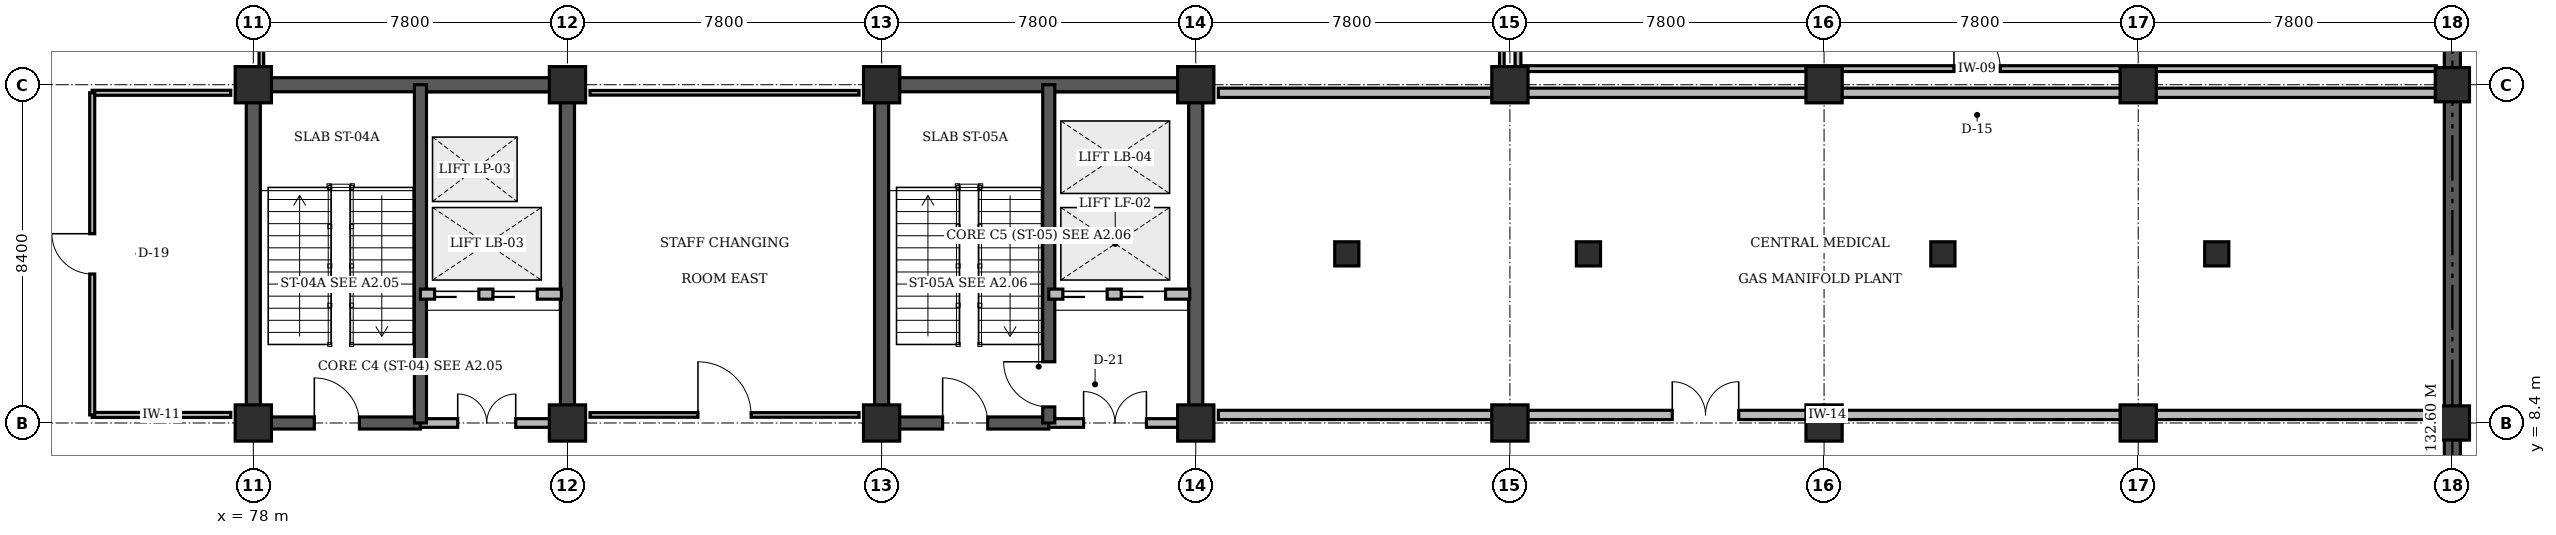
"""IFC4 building model, lengths in metres.
Left out: names, types, materials, properties, quantities, classifications, styles, units other than length and angle.
Written with IfcOpenShell. Run it as: python <this file> out.ifc"""

import sys

from ifc_helpers import new_model, si_unit, direction, frame, frame_2d, origin, origin_2d, place, context, subcontext, project, spatial, rectangle, circle, extrude, element, fill, save


model = new_model("IFC4")
c1 = context("Model", 3, precision=1e-05, world=origin(), true_north=direction((0.0, 1.0)))
c2 = subcontext(c1, "Body", "Model", "MODEL_VIEW")
j1 = project(units=[si_unit("LENGTHUNIT", "METRE"), si_unit("PLANEANGLEUNIT", "RADIAN")], contexts=[c1])
p1 = place(None, origin())
s1 = spatial("IfcSite", under=j1, at=p1, CompositionType="ELEMENT")
p2 = place(p1, origin())
s2 = spatial("IfcBuilding", under=s1, at=p2, CompositionType="ELEMENT")
p3 = place(p2, frame((0.0, 0.0, -4.8)))
s3 = spatial("IfcBuildingStorey", under=s2, at=p3, CompositionType="ELEMENT", Elevation=-4.8)
p4 = place(p3, frame((77.825, 16.8, 0.0), z_axis=(0.0, 0.0, 1.0), x_axis=(1.0, 0.0, 0.0)))
e1 = element("IfcWall", 1, at=p4, inside=s3, PredefinedType="SHEAR", context=c2, shape_type="SweptSolid", body=[
    extrude(rectangle(XDim=8.15, YDim=0.35, at=frame_2d((4.075, 0.0))), origin(), (0.0, 0.0, 1.0), 4.4),
])
for number, where, z_axis, x_axis in (
    (2, (78.0, 8.4, 0.0), (0.0, 0.0, 1.0), (0.0, 1.0, 0.0)),
    (3, (85.8, 8.4, 0.0), (0.0, 0.0, 1.0), (0.0, 1.0, 0.0)),
):
    element("IfcWall", number, at=place(p3, frame(where, z_axis=z_axis, x_axis=x_axis)), inside=s3, PredefinedType="SHEAR", context=c2, shape_type="SweptSolid", body=[
        extrude(rectangle(XDim=8.4, YDim=0.35, at=frame_2d((4.2, 0.0))), origin(), (0.0, 0.0, 1.0), 4.4),
    ])
p5 = place(p3, frame((93.425, 16.8, 0.0), z_axis=(0.0, 0.0, 1.0), x_axis=(1.0, 0.0, 0.0)))
e4 = element("IfcWall", 4, at=p5, inside=s3, PredefinedType="SHEAR", context=c2, shape_type="SweptSolid", body=[
    extrude(rectangle(XDim=8.15, YDim=0.35, at=frame_2d((4.075, 0.0))), origin(), (0.0, 0.0, 1.0), 4.4),
])
for number, where, z_axis, x_axis in (
    (5, (93.6, 8.4, 0.0), (0.0, 0.0, 1.0), (0.0, 1.0, 0.0)),
    (6, (101.4, 8.4, 0.0), (0.0, 0.0, 1.0), (0.0, 1.0, 0.0)),
):
    element("IfcWall", number, at=place(p3, frame(where, z_axis=z_axis, x_axis=x_axis)), inside=s3, PredefinedType="SHEAR", context=c2, shape_type="SweptSolid", body=[
        extrude(rectangle(XDim=8.4, YDim=0.35, at=frame_2d((4.2, 0.0))), origin(), (0.0, 0.0, 1.0), 4.4),
    ])
p6 = place(p3, frame((132.6, 0.0, 0.0), z_axis=(0.0, 0.0, 1.0), x_axis=(0.0, 1.0, 0.0)))
e7 = element("IfcWall", 7, at=p6, inside=s3, PredefinedType="SOLIDWALL", context=c2, shape_type="SweptSolid", body=[
    extrude(rectangle(XDim=42.0, YDim=0.4, at=frame_2d((21.0, 0.0))), origin(), (0.0, 0.0, 1.0), 4.8),
])
for number, where, z_axis, x_axis in (
    (8, (78.0, 8.4, 0.0), (0.0, 0.0, 1.0), (1.0, 0.0, 0.0)),
    (9, (78.0, 16.8, 0.0), (0.0, 0.0, 1.0), (1.0, 0.0, 0.0)),
    (10, (85.8, 8.4, 0.0), (0.0, 0.0, 1.0), (1.0, 0.0, 0.0)),
    (11, (85.8, 16.8, 0.0), (0.0, 0.0, 1.0), (1.0, 0.0, 0.0)),
    (12, (93.6, 8.4, 0.0), (0.0, 0.0, 1.0), (1.0, 0.0, 0.0)),
    (13, (93.6, 16.8, 0.0), (0.0, 0.0, 1.0), (1.0, 0.0, 0.0)),
    (14, (101.4, 8.4, 0.0), (0.0, 0.0, 1.0), (1.0, 0.0, 0.0)),
    (15, (101.4, 16.8, 0.0), (0.0, 0.0, 1.0), (1.0, 0.0, 0.0)),
    (16, (109.2, 8.4, 0.0), (0.0, 0.0, 1.0), (1.0, 0.0, 0.0)),
    (17, (109.2, 16.8, 0.0), (0.0, 0.0, 1.0), (1.0, 0.0, 0.0)),
    (18, (117.0, 8.4, 0.0), (0.0, 0.0, 1.0), (1.0, 0.0, 0.0)),
    (19, (117.0, 16.8, 0.0), (0.0, 0.0, 1.0), (1.0, 0.0, 0.0)),
    (20, (124.8, 8.4, 0.0), (0.0, 0.0, 1.0), (1.0, 0.0, 0.0)),
    (21, (124.8, 16.8, 0.0), (0.0, 0.0, 1.0), (1.0, 0.0, 0.0)),
):
    element("IfcColumn", number, at=place(p3, frame(where, z_axis=z_axis, x_axis=x_axis)), inside=s3, PredefinedType="COLUMN", context=c2, shape_type="SweptSolid", body=[
        extrude(rectangle(XDim=0.9, YDim=0.9, at=origin_2d()), origin(), (0.0, 0.0, 1.0), 4.8),
    ])
for number, where, z_axis, x_axis in (
    (22, (132.6, 8.4, 0.0), (0.0, 0.0, 1.0), (1.0, 0.0, 0.0)),
    (23, (132.6, 16.8, 0.0), (0.0, 0.0, 1.0), (1.0, 0.0, 0.0)),
):
    element("IfcColumn", number, at=place(p3, frame(where, z_axis=z_axis, x_axis=x_axis)), inside=s3, PredefinedType="COLUMN", context=c2, shape_type="SweptSolid", body=[
        extrude(rectangle(XDim=0.85, YDim=0.85, at=origin_2d()), origin(), (0.0, 0.0, 1.0), 4.8),
    ])
for number, where, z_axis, x_axis in (
    (24, (126.75, 12.6, -0.4), (0.0, 0.0, 1.0), (1.0, 0.0, 0.0)),
    (25, (119.95, 12.6, -0.4), (0.0, 0.0, 1.0), (1.0, 0.0, 0.0)),
    (26, (111.15, 12.6, -0.4), (0.0, 0.0, 1.0), (1.0, 0.0, 0.0)),
    (27, (105.15, 12.6, -0.4), (0.0, 0.0, 1.0), (1.0, 0.0, 0.0)),
):
    element("IfcColumn", number, at=place(p3, frame(where, z_axis=z_axis, x_axis=x_axis)), inside=s3, PredefinedType="PILASTER", context=c2, shape_type="SweptSolid", body=[
        extrude(circle(Radius=0.3, at=origin_2d()), origin(), (0.0, 0.0, 1.0), 5.2),
    ])
p7 = place(p3, frame((78.0, 8.4, 0.0), z_axis=(0.0, 0.0, 1.0), x_axis=(1.0, 0.0, 0.0)))
e28 = element("IfcWall", 28, at=p7, inside=s3, PredefinedType="SHEAR", context=c2, shape_type="SweptSolid", body=[
    extrude(rectangle(XDim=4.15, YDim=0.3, at=frame_2d((2.075, 0.0))), origin(), (0.0, 0.0, 1.0), 4.8),
])
p8 = place(p7, frame((1.515, 0.0, 0.0)))
e29 = element("IfcOpeningElement", 29, at=p8, cuts=e28, PredefinedType="OPENING", context=c2, shape_type="SweptSolid", body=[
    extrude(rectangle(XDim=1.12, YDim=2.15, at=frame_2d((0.56, 1.075))), frame((0.0, 0.16, 0.0), z_axis=(0.0, -1.0, 0.0), x_axis=(1.0, 0.0, 0.0)), (0.0, 0.0, 1.0), 0.32),
])
p9 = place(p3, frame((82.15, 8.4, 0.0), z_axis=(0.0, 0.0, 1.0), x_axis=(1.0, 0.0, 0.0)))
e30 = element("IfcWall", 30, at=p9, inside=s3, PredefinedType="STANDARD", context=c2, shape_type="SweptSolid", body=[
    extrude(rectangle(XDim=3.29, YDim=0.215, at=frame_2d((1.645, 0.0))), origin(), (0.0, 0.0, 1.0), 3.53),
])
p10 = place(p9, frame((0.925, 0.0, 0.0)))
e31 = element("IfcOpeningElement", 31, at=p10, cuts=e30, PredefinedType="OPENING", context=c2, shape_type="SweptSolid", body=[
    extrude(rectangle(XDim=1.44, YDim=2.2, at=frame_2d((0.72, 1.1))), frame((0.0, 0.118, 0.0), z_axis=(0.0, -1.0, 0.0), x_axis=(1.0, 0.0, 0.0)), (0.0, 0.0, 1.0), 0.235),
])
p11 = place(p3, frame((82.15, 8.4, 0.0), z_axis=(0.0, 0.0, 1.0), x_axis=(0.0, 1.0, 0.0)))
e32 = element("IfcWall", 32, at=p11, inside=s3, PredefinedType="SHEAR", context=c2, shape_type="SweptSolid", body=[
    extrude(rectangle(XDim=8.4, YDim=0.3, at=frame_2d((4.2, 0.0))), origin(), (0.0, 0.0, 1.0), 4.8),
])
p12 = place(p3, frame((82.15, 11.6, 0.0), z_axis=(0.0, 0.0, 1.0), x_axis=(1.0, 0.0, 0.0)))
e33 = element("IfcWall", 33, at=p12, inside=s3, PredefinedType="STANDARD", context=c2, shape_type="SweptSolid", body=[
    extrude(rectangle(XDim=3.5, YDim=0.25, at=frame_2d((1.75, 0.0))), origin(), (0.0, 0.0, 1.0), 4.46),
])
p13 = place(p12, frame((0.35, 0.0, 0.0)))
e34 = element("IfcOpeningElement", 34, at=p13, cuts=e33, PredefinedType="OPENING", context=c2, shape_type="SweptSolid", body=[
    extrude(rectangle(XDim=1.1, YDim=2.2, at=frame_2d((0.55, 1.1))), frame((0.0, 0.135, 0.0), z_axis=(0.0, -1.0, 0.0), x_axis=(1.0, 0.0, 0.0)), (0.0, 0.0, 1.0), 0.27),
])
p14 = place(p12, frame((1.8, 0.0, 0.0)))
e35 = element("IfcOpeningElement", 35, at=p14, cuts=e33, PredefinedType="OPENING", context=c2, shape_type="SweptSolid", body=[
    extrude(rectangle(XDim=1.1, YDim=2.2, at=frame_2d((0.55, 1.1))), frame((0.0, 0.135, 0.0), z_axis=(0.0, -1.0, 0.0), x_axis=(1.0, 0.0, 0.0)), (0.0, 0.0, 1.0), 0.27),
])
p15 = place(p3, frame((93.6, 8.4, 0.0), z_axis=(0.0, 0.0, 1.0), x_axis=(1.0, 0.0, 0.0)))
e36 = element("IfcWall", 36, at=p15, inside=s3, PredefinedType="SHEAR", context=c2, shape_type="SweptSolid", body=[
    extrude(rectangle(XDim=4.15, YDim=0.3, at=frame_2d((2.075, 0.0))), origin(), (0.0, 0.0, 1.0), 4.8),
])
p16 = place(p15, frame((1.515, 0.0, 0.0)))
e37 = element("IfcOpeningElement", 37, at=p16, cuts=e36, PredefinedType="OPENING", context=c2, shape_type="SweptSolid", body=[
    extrude(rectangle(XDim=1.12, YDim=2.15, at=frame_2d((0.56, 1.075))), frame((0.0, 0.16, 0.0), z_axis=(0.0, -1.0, 0.0), x_axis=(1.0, 0.0, 0.0)), (0.0, 0.0, 1.0), 0.32),
])
p17 = place(p3, frame((97.75, 8.4, 0.0), z_axis=(0.0, 0.0, 1.0), x_axis=(1.0, 0.0, 0.0)))
e38 = element("IfcWall", 38, at=p17, inside=s3, PredefinedType="STANDARD", context=c2, shape_type="SweptSolid", body=[
    extrude(rectangle(XDim=3.29, YDim=0.215, at=frame_2d((1.645, 0.0))), origin(), (0.0, 0.0, 1.0), 3.53),
])
p18 = place(p17, frame((0.865, 0.0, 0.0)))
e39 = element("IfcOpeningElement", 39, at=p18, cuts=e38, PredefinedType="OPENING", context=c2, shape_type="SweptSolid", body=[
    extrude(rectangle(XDim=1.56, YDim=2.2, at=frame_2d((0.78, 1.1))), frame((0.0, 0.118, 0.0), z_axis=(0.0, -1.0, 0.0), x_axis=(1.0, 0.0, 0.0)), (0.0, 0.0, 1.0), 0.235),
])
p19 = place(p3, frame((97.75, 8.4, 0.0), z_axis=(0.0, 0.0, 1.0), x_axis=(0.0, 1.0, 0.0)))
e40 = element("IfcWall", 40, at=p19, inside=s3, PredefinedType="SHEAR", context=c2, shape_type="SweptSolid", body=[
    extrude(rectangle(XDim=8.4, YDim=0.3, at=frame_2d((4.2, 0.0))), origin(), (0.0, 0.0, 1.0), 4.8),
])
p20 = place(p19, frame((0.4, 0.0, 0.0)))
e41 = element("IfcOpeningElement", 41, at=p20, cuts=e40, PredefinedType="OPENING", context=c2, shape_type="SweptSolid", body=[
    extrude(rectangle(XDim=1.12, YDim=2.15, at=frame_2d((0.56, 1.075))), frame((0.0, 0.16, 0.0), z_axis=(0.0, -1.0, 0.0), x_axis=(1.0, 0.0, 0.0)), (0.0, 0.0, 1.0), 0.32),
])
p21 = place(p3, frame((97.75, 11.6, 0.0), z_axis=(0.0, 0.0, 1.0), x_axis=(1.0, 0.0, 0.0)))
e42 = element("IfcWall", 42, at=p21, inside=s3, PredefinedType="STANDARD", context=c2, shape_type="SweptSolid", body=[
    extrude(rectangle(XDim=3.5, YDim=0.25, at=frame_2d((1.75, 0.0))), origin(), (0.0, 0.0, 1.0), 4.46),
])
p22 = place(p21, frame((0.35, 0.0, 0.0)))
e43 = element("IfcOpeningElement", 43, at=p22, cuts=e42, PredefinedType="OPENING", context=c2, shape_type="SweptSolid", body=[
    extrude(rectangle(XDim=1.1, YDim=2.2, at=frame_2d((0.55, 1.1))), frame((0.0, 0.135, 0.0), z_axis=(0.0, -1.0, 0.0), x_axis=(1.0, 0.0, 0.0)), (0.0, 0.0, 1.0), 0.27),
])
p23 = place(p21, frame((1.8, 0.0, 0.0)))
e44 = element("IfcOpeningElement", 44, at=p23, cuts=e42, PredefinedType="OPENING", context=c2, shape_type="SweptSolid", body=[
    extrude(rectangle(XDim=1.1, YDim=2.2, at=frame_2d((0.55, 1.1))), frame((0.0, 0.135, 0.0), z_axis=(0.0, -1.0, 0.0), x_axis=(1.0, 0.0, 0.0)), (0.0, 0.0, 1.0), 0.27),
])
for number, where, z_axis, x_axis in (
    (45, (74.0, 8.6, 0.0), (0.0, 0.0, 1.0), (1.0, 0.0, 0.0)),
    (46, (74.0, 16.6, 0.0), (0.0, 0.0, 1.0), (1.0, 0.0, 0.0)),
):
    element("IfcWall", number, at=place(p3, frame(where, z_axis=z_axis, x_axis=x_axis)), inside=s3, PredefinedType="PARTITIONING", context=c2, shape_type="SweptSolid", body=[
        extrude(rectangle(XDim=3.44, YDim=0.125, at=frame_2d((1.72, 0.0))), origin(), (0.0, 0.0, 1.0), 3.53),
    ])
p24 = place(p3, frame((74.0, 8.6, 0.0), z_axis=(0.0, 0.0, 1.0), x_axis=(0.0, 1.0, 0.0)))
e47 = element("IfcWall", 47, at=p24, inside=s3, PredefinedType="PARTITIONING", context=c2, shape_type="SweptSolid", body=[
    extrude(rectangle(XDim=8.0, YDim=0.125, at=frame_2d((4.0, 0.0))), origin(), (0.0, 0.0, 1.0), 4.46),
])
p25 = place(p24, frame((3.5, 0.0, 0.0)))
e48 = element("IfcOpeningElement", 48, at=p25, cuts=e47, PredefinedType="OPENING", context=c2, shape_type="SweptSolid", body=[
    extrude(rectangle(XDim=1.0, YDim=2.1, at=frame_2d((0.5, 1.05))), frame((0.0, 0.073, 0.0), z_axis=(0.0, -1.0, 0.0), x_axis=(1.0, 0.0, 0.0)), (0.0, 0.0, 1.0), 0.145),
])
p26 = place(p3, frame((78.2, 17.2, 0.0), z_axis=(0.0, 0.0, 1.0), x_axis=(0.0, 1.0, 0.0)))
e49 = element("IfcWall", 49, at=p26, inside=s3, PredefinedType="PARTITIONING", context=c2, shape_type="SweptSolid", body=[
    extrude(rectangle(XDim=7.6, YDim=0.115, at=frame_2d((3.8, 0.0))), origin(), (0.0, 0.0, 1.0), 3.515),
])
p27 = place(p26, frame((3.14, 0.0, 0.0)))
e50 = element("IfcOpeningElement", 50, at=p27, cuts=e49, PredefinedType="OPENING", context=c2, shape_type="SweptSolid", body=[
    extrude(rectangle(XDim=1.32, YDim=2.15, at=frame_2d((0.66, 1.075))), frame((0.0, 0.067, 0.0), z_axis=(0.0, -1.0, 0.0), x_axis=(1.0, 0.0, 0.0)), (0.0, 0.0, 1.0), 0.135),
])
p28 = place(p3, frame((109.0, 17.2, 0.0), z_axis=(0.0, 0.0, 1.0), x_axis=(0.0, 1.0, 0.0)))
e51 = element("IfcWall", 51, at=p28, inside=s3, PredefinedType="PARTITIONING", context=c2, shape_type="SweptSolid", body=[
    extrude(rectangle(XDim=7.6, YDim=0.115, at=frame_2d((3.8, 0.0))), origin(), (0.0, 0.0, 1.0), 3.515),
])
p29 = place(p3, frame((109.4, 17.2, 0.0), z_axis=(0.0, 0.0, 1.0), x_axis=(1.0, 0.0, 0.0)))
e52 = element("IfcWall", 52, at=p29, inside=s3, PredefinedType="PARTITIONING", context=c2, shape_type="SweptSolid", body=[
    extrude(rectangle(XDim=22.8, YDim=0.145, at=frame_2d((11.4, 0.0))), origin(), (0.0, 0.0, 1.0), 3.53),
])
p30 = place(p29, frame((10.825, 0.0, 0.0)))
e53 = element("IfcOpeningElement", 53, at=p30, cuts=e52, PredefinedType="OPENING", context=c2, shape_type="SweptSolid", body=[
    extrude(rectangle(XDim=1.15, YDim=2.15, at=frame_2d((0.575, 1.075))), frame((0.0, 0.083, 0.0), z_axis=(0.0, -1.0, 0.0), x_axis=(1.0, 0.0, 0.0)), (0.0, 0.0, 1.0), 0.165),
])
p31 = place(p3, frame((109.4, 17.2, 0.0), z_axis=(0.0, 0.0, 1.0), x_axis=(0.0, 1.0, 0.0)))
e54 = element("IfcWall", 54, at=p31, inside=s3, PredefinedType="PARTITIONING", context=c2, shape_type="SweptSolid", body=[
    extrude(rectangle(XDim=7.6, YDim=0.145, at=frame_2d((3.8, 0.0))), origin(), (0.0, 0.0, 1.0), 3.515),
])
p32 = place(p3, frame((86.36, 8.6, 0.0), z_axis=(0.0, 0.0, 1.0), x_axis=(1.0, 0.0, 0.0)))
e55 = element("IfcWall", 55, at=p32, inside=s3, PredefinedType="PARTITIONING", context=c2, shape_type="SweptSolid", body=[
    extrude(rectangle(XDim=6.68, YDim=0.115, at=frame_2d((3.34, 0.0))), origin(), (0.0, 0.0, 1.0), 3.53),
])
p33 = place(p32, frame((2.68, 0.0, 0.0)))
e56 = element("IfcOpeningElement", 56, at=p33, cuts=e55, PredefinedType="OPENING", context=c2, shape_type="SweptSolid", body=[
    extrude(rectangle(XDim=1.32, YDim=2.15, at=frame_2d((0.66, 1.075))), frame((0.0, 0.067, 0.0), z_axis=(0.0, -1.0, 0.0), x_axis=(1.0, 0.0, 0.0)), (0.0, 0.0, 1.0), 0.135),
])
p34 = place(p3, frame((86.36, 16.6, 0.0), z_axis=(0.0, 0.0, 1.0), x_axis=(1.0, 0.0, 0.0)))
e57 = element("IfcWall", 57, at=p34, inside=s3, PredefinedType="PARTITIONING", context=c2, shape_type="SweptSolid", body=[
    extrude(rectangle(XDim=6.68, YDim=0.115, at=frame_2d((3.34, 0.0))), origin(), (0.0, 0.0, 1.0), 3.53),
])
p35 = place(p3, frame((101.96, 8.6, 0.0), z_axis=(0.0, 0.0, 1.0), x_axis=(1.0, 0.0, 0.0)))
e58 = element("IfcWall", 58, at=p35, inside=s3, PredefinedType="STANDARD", context=c2, shape_type="SweptSolid", body=[
    extrude(rectangle(XDim=30.24, YDim=0.23, at=frame_2d((15.12, 0.0))), origin(), (0.0, 0.0, 1.0), 3.53),
])
p36 = place(p35, frame((11.271, 0.0, 0.0)))
e59 = element("IfcOpeningElement", 59, at=p36, cuts=e58, PredefinedType="OPENING", context=c2, shape_type="SweptSolid", body=[
    extrude(rectangle(XDim=1.65, YDim=2.25, at=frame_2d((0.825, 1.125))), frame((0.0, 0.125, 0.0), z_axis=(0.0, -1.0, 0.0), x_axis=(1.0, 0.0, 0.0)), (0.0, 0.0, 1.0), 0.25),
])
p37 = place(p3, frame((101.96, 16.6, 0.0), z_axis=(0.0, 0.0, 1.0), x_axis=(1.0, 0.0, 0.0)))
e60 = element("IfcWall", 60, at=p37, inside=s3, PredefinedType="STANDARD", context=c2, shape_type="SweptSolid", body=[
    extrude(rectangle(XDim=30.24, YDim=0.23, at=frame_2d((15.12, 0.0))), origin(), (0.0, 0.0, 1.0), 3.53),
])
p38 = place(p8, origin())
e61 = element("IfcDoor", 61, at=p38, inside=s3, OperationType="SINGLE_SWING_LEFT", PredefinedType="DOOR", context=c2, shape_type="SweptSolid", body=[
    extrude(rectangle(XDim=1.12, YDim=2.15, at=frame_2d((0.56, 1.075))), frame((0.0, 0.025, 0.0), z_axis=(0.0, -1.0, 0.0), x_axis=(1.0, 0.0, 0.0)), (0.0, 0.0, 1.0), 0.05),
])
fill(e29, e61)
p39 = place(p10, origin())
e62 = element("IfcDoor", 62, at=p39, inside=s3, OperationType="DOUBLE_DOOR_SINGLE_SWING", PredefinedType="DOOR", context=c2, shape_type="SweptSolid", body=[
    extrude(rectangle(XDim=1.44, YDim=2.2, at=frame_2d((0.72, 1.1))), frame((0.0, 0.025, 0.0), z_axis=(0.0, -1.0, 0.0), x_axis=(1.0, 0.0, 0.0)), (0.0, 0.0, 1.0), 0.05),
])
fill(e31, e62)
p40 = place(p13, origin())
e63 = element("IfcDoor", 63, at=p40, inside=s3, OperationType="SLIDING_TO_LEFT", PredefinedType="DOOR", context=c2, shape_type="SweptSolid", body=[
    extrude(rectangle(XDim=1.1, YDim=2.2, at=frame_2d((0.55, 1.1))), frame((0.0, 0.025, 0.0), z_axis=(0.0, -1.0, 0.0), x_axis=(1.0, 0.0, 0.0)), (0.0, 0.0, 1.0), 0.05),
])
fill(e34, e63)
p41 = place(p14, origin())
e64 = element("IfcDoor", 64, at=p41, inside=s3, OperationType="SLIDING_TO_LEFT", PredefinedType="DOOR", context=c2, shape_type="SweptSolid", body=[
    extrude(rectangle(XDim=1.1, YDim=2.2, at=frame_2d((0.55, 1.1))), frame((0.0, 0.025, 0.0), z_axis=(0.0, -1.0, 0.0), x_axis=(1.0, 0.0, 0.0)), (0.0, 0.0, 1.0), 0.05),
])
fill(e35, e64)
p42 = place(p16, origin())
e65 = element("IfcDoor", 65, at=p42, inside=s3, OperationType="SINGLE_SWING_LEFT", PredefinedType="DOOR", context=c2, shape_type="SweptSolid", body=[
    extrude(rectangle(XDim=1.12, YDim=2.15, at=frame_2d((0.56, 1.075))), frame((0.0, 0.025, 0.0), z_axis=(0.0, -1.0, 0.0), x_axis=(1.0, 0.0, 0.0)), (0.0, 0.0, 1.0), 0.05),
])
fill(e37, e65)
p43 = place(p18, origin())
e66 = element("IfcDoor", 66, at=p43, inside=s3, OperationType="DOUBLE_DOOR_SINGLE_SWING", PredefinedType="DOOR", context=c2, shape_type="SweptSolid", body=[
    extrude(rectangle(XDim=1.56, YDim=2.2, at=frame_2d((0.78, 1.1))), frame((0.0, 0.025, 0.0), z_axis=(0.0, -1.0, 0.0), x_axis=(1.0, 0.0, 0.0)), (0.0, 0.0, 1.0), 0.05),
])
fill(e39, e66)
p44 = place(p20, origin())
e67 = element("IfcDoor", 67, at=p44, inside=s3, OperationType="SINGLE_SWING_RIGHT", PredefinedType="DOOR", context=c2, shape_type="SweptSolid", body=[
    extrude(rectangle(XDim=1.12, YDim=2.15, at=frame_2d((0.56, 1.075))), frame((0.0, 0.025, 0.0), z_axis=(0.0, -1.0, 0.0), x_axis=(1.0, 0.0, 0.0)), (0.0, 0.0, 1.0), 0.05),
])
fill(e41, e67)
p45 = place(p22, origin())
e68 = element("IfcDoor", 68, at=p45, inside=s3, OperationType="SLIDING_TO_LEFT", PredefinedType="DOOR", context=c2, shape_type="SweptSolid", body=[
    extrude(rectangle(XDim=1.1, YDim=2.2, at=frame_2d((0.55, 1.1))), frame((0.0, 0.025, 0.0), z_axis=(0.0, -1.0, 0.0), x_axis=(1.0, 0.0, 0.0)), (0.0, 0.0, 1.0), 0.05),
])
fill(e43, e68)
p46 = place(p23, origin())
e69 = element("IfcDoor", 69, at=p46, inside=s3, OperationType="SLIDING_TO_LEFT", PredefinedType="DOOR", context=c2, shape_type="SweptSolid", body=[
    extrude(rectangle(XDim=1.1, YDim=2.2, at=frame_2d((0.55, 1.1))), frame((0.0, 0.025, 0.0), z_axis=(0.0, -1.0, 0.0), x_axis=(1.0, 0.0, 0.0)), (0.0, 0.0, 1.0), 0.05),
])
fill(e44, e69)
p47 = place(p25, origin())
e70 = element("IfcDoor", 70, at=p47, inside=s3, OperationType="SINGLE_SWING_RIGHT", PredefinedType="DOOR", context=c2, shape_type="SweptSolid", body=[
    extrude(rectangle(XDim=1.0, YDim=2.1, at=frame_2d((0.5, 1.05))), frame((0.0, 0.025, 0.0), z_axis=(0.0, -1.0, 0.0), x_axis=(1.0, 0.0, 0.0)), (0.0, 0.0, 1.0), 0.05),
])
fill(e48, e70)
p48 = place(p30, origin())
e71 = element("IfcDoor", 71, at=p48, inside=s3, OperationType="SINGLE_SWING_LEFT", PredefinedType="DOOR", context=c2, shape_type="SweptSolid", body=[
    extrude(rectangle(XDim=1.15, YDim=2.15, at=frame_2d((0.575, 1.075))), frame((0.0, 0.025, 0.0), z_axis=(0.0, -1.0, 0.0), x_axis=(1.0, 0.0, 0.0)), (0.0, 0.0, 1.0), 0.05),
])
fill(e53, e71)
p49 = place(p33, origin())
e72 = element("IfcDoor", 72, at=p49, inside=s3, OperationType="SINGLE_SWING_LEFT", PredefinedType="DOOR", context=c2, shape_type="SweptSolid", body=[
    extrude(rectangle(XDim=1.32, YDim=2.15, at=frame_2d((0.66, 1.075))), frame((0.0, 0.025, 0.0), z_axis=(0.0, -1.0, 0.0), x_axis=(1.0, 0.0, 0.0)), (0.0, 0.0, 1.0), 0.05),
])
fill(e56, e72)
p50 = place(p36, origin())
e73 = element("IfcDoor", 73, at=p50, inside=s3, OperationType="DOUBLE_DOOR_SINGLE_SWING", PredefinedType="DOOR", context=c2, shape_type="SweptSolid", body=[
    extrude(rectangle(XDim=1.65, YDim=2.25, at=frame_2d((0.825, 1.125))), frame((0.0, 0.025, 0.0), z_axis=(0.0, -1.0, 0.0), x_axis=(1.0, 0.0, 0.0)), (0.0, 0.0, 1.0), 0.05),
])
fill(e59, e73)
save(model, sys.argv[1])
